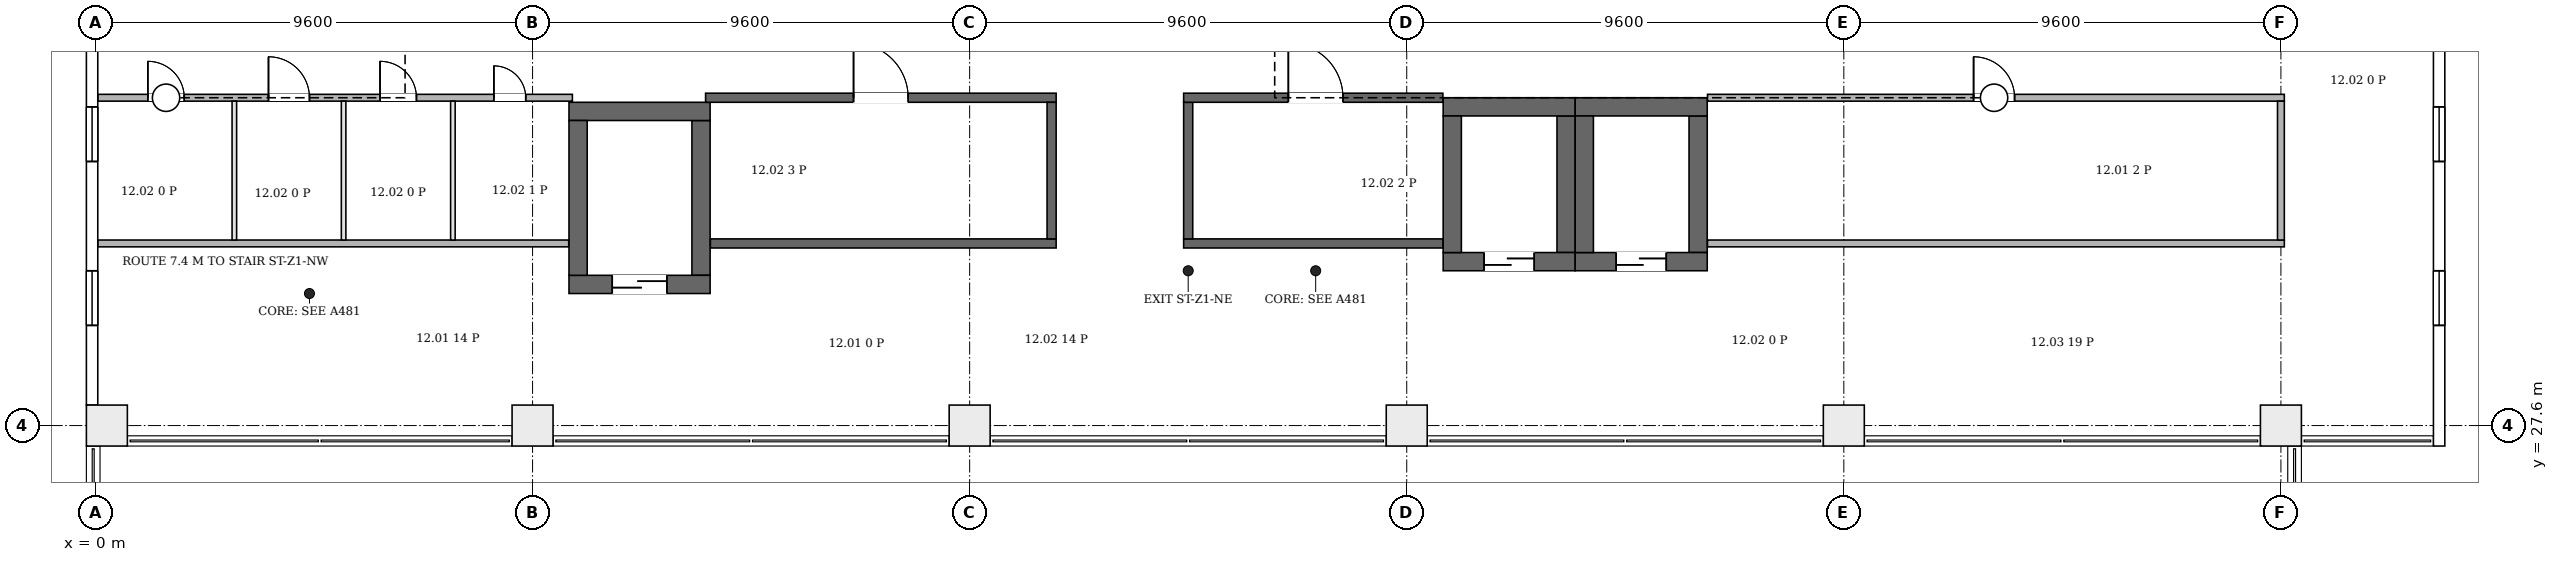
"""IFC4 building model, lengths in metres.
Left out: names, types, materials, properties, quantities, classifications, styles, units other than length and angle.
Written with IfcOpenShell. Run it as: python <this file> out.ifc"""

import sys

from ifc_helpers import new_model, si_unit, direction, frame, frame_2d, origin, origin_2d, place, context, subcontext, project, spatial, rectangle, extrude, element, fill, save


model = new_model("IFC4")
c1 = context("Model", 3, precision=1e-05, world=origin(), true_north=direction((0.0, 1.0)))
c2 = subcontext(c1, "Body", "Model", "MODEL_VIEW")
j1 = project(units=[si_unit("LENGTHUNIT", "METRE"), si_unit("PLANEANGLEUNIT", "RADIAN")], contexts=[c1])
p1 = place(None, origin())
s1 = spatial("IfcSite", under=j1, at=p1, CompositionType="ELEMENT")
p2 = place(p1, origin())
s2 = spatial("IfcBuilding", under=s1, at=p2, CompositionType="ELEMENT")
p3 = place(p2, frame((0.0, 0.0, 61.3)))
s3 = spatial("IfcBuildingStorey", under=s2, at=p3, CompositionType="ELEMENT", Elevation=61.3)
p4 = place(p3, frame((10.4, 30.7, 0.0), z_axis=(0.0, 0.0, 1.0), x_axis=(1.0, 0.0, 0.0)))
e1 = element("IfcWall", 1, at=p4, inside=s3, PredefinedType="SHEAR", context=c2, shape_type="SweptSolid", body=[
    extrude(rectangle(XDim=3.1, YDim=0.4, at=frame_2d((1.55, 0.0))), origin(), (0.0, 0.0, 1.0), 4.2),
])
p5 = place(p4, frame((0.95, 0.0, 0.0)))
e2 = element("IfcOpeningElement", 2, at=p5, cuts=e1, PredefinedType="OPENING", context=c2, shape_type="SweptSolid", body=[
    extrude(rectangle(XDim=1.2, YDim=2.1, at=frame_2d((0.6, 1.05))), frame((0.0, 0.21, 0.0), z_axis=(0.0, -1.0, 0.0), x_axis=(1.0, 0.0, 0.0)), (0.0, 0.0, 1.0), 0.42),
])
p6 = place(p3, frame((10.4, 34.5, 0.0), z_axis=(0.0, 0.0, 1.0), x_axis=(1.0, 0.0, 0.0)))
e3 = element("IfcWall", 3, at=p6, inside=s3, PredefinedType="SHEAR", context=c2, shape_type="SweptSolid", body=[
    extrude(rectangle(XDim=3.1, YDim=0.4, at=frame_2d((1.55, 0.0))), origin(), (0.0, 0.0, 1.0), 4.2),
])
for number, where, z_axis, x_axis in (
    (4, (10.6, 30.9, 0.0), (0.0, 0.0, 1.0), (0.0, 1.0, 0.0)),
    (5, (13.3, 30.9, 0.0), (0.0, 0.0, 1.0), (0.0, 1.0, 0.0)),
):
    element("IfcWall", number, at=place(p3, frame(where, z_axis=z_axis, x_axis=x_axis)), inside=s3, PredefinedType="SHEAR", context=c2, shape_type="SweptSolid", body=[
        extrude(rectangle(XDim=3.4, YDim=0.4, at=frame_2d((1.7, 0.0))), origin(), (0.0, 0.0, 1.0), 4.2),
    ])
p7 = place(p3, frame((29.6, 31.2, 0.0), z_axis=(0.0, 0.0, 1.0), x_axis=(1.0, 0.0, 0.0)))
e6 = element("IfcWall", 6, at=p7, inside=s3, PredefinedType="SHEAR", context=c2, shape_type="SweptSolid", body=[
    extrude(rectangle(XDim=2.9, YDim=0.4, at=frame_2d((1.45, 0.0))), origin(), (0.0, 0.0, 1.0), 4.2),
])
p8 = place(p7, frame((0.9, 0.0, 0.0)))
e7 = element("IfcOpeningElement", 7, at=p8, cuts=e6, PredefinedType="OPENING", context=c2, shape_type="SweptSolid", body=[
    extrude(rectangle(XDim=1.1, YDim=2.1, at=frame_2d((0.55, 1.05))), frame((0.0, 0.21, 0.0), z_axis=(0.0, -1.0, 0.0), x_axis=(1.0, 0.0, 0.0)), (0.0, 0.0, 1.0), 0.42),
])
p9 = place(p3, frame((29.6, 34.6, 0.0), z_axis=(0.0, 0.0, 1.0), x_axis=(1.0, 0.0, 0.0)))
e8 = element("IfcWall", 8, at=p9, inside=s3, PredefinedType="SHEAR", context=c2, shape_type="SweptSolid", body=[
    extrude(rectangle(XDim=2.9, YDim=0.4, at=frame_2d((1.45, 0.0))), origin(), (0.0, 0.0, 1.0), 4.2),
])
for number, where, z_axis, x_axis in (
    (9, (29.8, 31.4, 0.0), (0.0, 0.0, 1.0), (0.0, 1.0, 0.0)),
    (10, (32.3, 31.4, 0.0), (0.0, 0.0, 1.0), (0.0, 1.0, 0.0)),
):
    element("IfcWall", number, at=place(p3, frame(where, z_axis=z_axis, x_axis=x_axis)), inside=s3, PredefinedType="SHEAR", context=c2, shape_type="SweptSolid", body=[
        extrude(rectangle(XDim=3.0, YDim=0.4, at=frame_2d((1.5, 0.0))), origin(), (0.0, 0.0, 1.0), 4.2),
    ])
p10 = place(p3, frame((32.5, 31.2, 0.0), z_axis=(0.0, 0.0, 1.0), x_axis=(1.0, 0.0, 0.0)))
e11 = element("IfcWall", 11, at=p10, inside=s3, PredefinedType="SHEAR", context=c2, shape_type="SweptSolid", body=[
    extrude(rectangle(XDim=2.9, YDim=0.4, at=frame_2d((1.45, 0.0))), origin(), (0.0, 0.0, 1.0), 4.2),
])
p11 = place(p10, frame((0.9, 0.0, 0.0)))
e12 = element("IfcOpeningElement", 12, at=p11, cuts=e11, PredefinedType="OPENING", context=c2, shape_type="SweptSolid", body=[
    extrude(rectangle(XDim=1.1, YDim=2.1, at=frame_2d((0.55, 1.05))), frame((0.0, 0.21, 0.0), z_axis=(0.0, -1.0, 0.0), x_axis=(1.0, 0.0, 0.0)), (0.0, 0.0, 1.0), 0.42),
])
p12 = place(p3, frame((32.5, 34.6, 0.0), z_axis=(0.0, 0.0, 1.0), x_axis=(1.0, 0.0, 0.0)))
e13 = element("IfcWall", 13, at=p12, inside=s3, PredefinedType="SHEAR", context=c2, shape_type="SweptSolid", body=[
    extrude(rectangle(XDim=2.9, YDim=0.4, at=frame_2d((1.45, 0.0))), origin(), (0.0, 0.0, 1.0), 4.2),
])
for number, where, z_axis, x_axis in (
    (14, (32.7, 31.4, 0.0), (0.0, 0.0, 1.0), (0.0, 1.0, 0.0)),
    (15, (35.2, 31.4, 0.0), (0.0, 0.0, 1.0), (0.0, 1.0, 0.0)),
):
    element("IfcWall", number, at=place(p3, frame(where, z_axis=z_axis, x_axis=x_axis)), inside=s3, PredefinedType="SHEAR", context=c2, shape_type="SweptSolid", body=[
        extrude(rectangle(XDim=3.0, YDim=0.4, at=frame_2d((1.5, 0.0))), origin(), (0.0, 0.0, 1.0), 4.2),
    ])
for number, where, z_axis, x_axis in (
    (16, (0.25, 27.6, 0.0), (0.0, 0.0, 1.0), (1.0, 0.0, 0.0)),
    (17, (9.6, 27.6, 0.0), (0.0, 0.0, 1.0), (1.0, 0.0, 0.0)),
    (18, (19.2, 27.6, 0.0), (0.0, 0.0, 1.0), (1.0, 0.0, 0.0)),
    (19, (28.8, 27.6, 0.0), (0.0, 0.0, 1.0), (1.0, 0.0, 0.0)),
    (20, (38.4, 27.6, 0.0), (0.0, 0.0, 1.0), (1.0, 0.0, 0.0)),
    (21, (48.0, 27.6, 0.0), (0.0, 0.0, 1.0), (1.0, 0.0, 0.0)),
):
    element("IfcColumn", number, at=place(p3, frame(where, z_axis=z_axis, x_axis=x_axis)), inside=s3, PredefinedType="COLUMN", context=c2, shape_type="SweptSolid", body=[
        extrude(rectangle(XDim=0.9, YDim=0.9, at=origin_2d()), origin(), (0.0, 0.0, 1.0), 4.2),
    ])
p13 = place(p3, frame((-0.074, 36.35, 0.0), z_axis=(0.0, 0.0, 1.0), x_axis=(0.0, -1.0, 0.0)))
e22 = element("IfcWall", 22, at=p13, inside=s3, PredefinedType="ELEMENTEDWALL", context=c2, shape_type="SweptSolid", body=[
    extrude(rectangle(XDim=8.3, YDim=0.25, at=frame_2d((4.15, 0.0))), origin(), (0.0, 0.0, 1.0), 3.9),
])
p14 = place(p13, frame((5.35, 0.0, 0.9)))
e23 = element("IfcOpeningElement", 23, at=p14, cuts=e22, PredefinedType="OPENING", context=c2, shape_type="SweptSolid", body=[
    extrude(rectangle(XDim=1.2, YDim=2.6, at=frame_2d((0.6, 1.3))), frame((0.0, 0.135, 0.0), z_axis=(0.0, -1.0, 0.0), x_axis=(1.0, 0.0, 0.0)), (0.0, 0.0, 1.0), 0.27),
])
p15 = place(p13, frame((1.75, 0.0, 0.9)))
e24 = element("IfcOpeningElement", 24, at=p15, cuts=e22, PredefinedType="OPENING", context=c2, shape_type="SweptSolid", body=[
    extrude(rectangle(XDim=1.2, YDim=2.6, at=frame_2d((0.6, 1.3))), frame((0.0, 0.135, 0.0), z_axis=(0.0, -1.0, 0.0), x_axis=(1.0, 0.0, 0.0)), (0.0, 0.0, 1.0), 0.27),
])
p16 = place(p3, frame((51.475, 27.15, 0.0), z_axis=(0.0, 0.0, 1.0), x_axis=(0.0, 1.0, 0.0)))
e25 = element("IfcWall", 25, at=p16, inside=s3, PredefinedType="ELEMENTEDWALL", context=c2, shape_type="SweptSolid", body=[
    extrude(rectangle(XDim=19.3, YDim=0.25, at=frame_2d((9.65, 0.0))), origin(), (0.0, 0.0, 1.0), 3.2),
])
p17 = place(p16, frame((2.65, 0.0, 0.6)))
e26 = element("IfcOpeningElement", 26, at=p17, cuts=e25, PredefinedType="OPENING", context=c2, shape_type="SweptSolid", body=[
    extrude(rectangle(XDim=1.2, YDim=2.5, at=frame_2d((0.6, 1.25))), frame((0.0, 0.135, 0.0), z_axis=(0.0, -1.0, 0.0), x_axis=(1.0, 0.0, 0.0)), (0.0, 0.0, 1.0), 0.27),
])
p18 = place(p16, frame((6.25, 0.0, 0.6)))
e27 = element("IfcOpeningElement", 27, at=p18, cuts=e25, PredefinedType="OPENING", context=c2, shape_type="SweptSolid", body=[
    extrude(rectangle(XDim=1.2, YDim=2.5, at=frame_2d((0.6, 1.25))), frame((0.0, 0.135, 0.0), z_axis=(0.0, -1.0, 0.0), x_axis=(1.0, 0.0, 0.0)), (0.0, 0.0, 1.0), 0.27),
])
p19 = place(p16, frame((11.85, 0.0, 0.6)))
e28 = element("IfcOpeningElement", 28, at=p19, cuts=e25, PredefinedType="OPENING", context=c2, shape_type="SweptSolid", body=[
    extrude(rectangle(XDim=1.2, YDim=2.5, at=frame_2d((0.6, 1.25))), frame((0.0, 0.135, 0.0), z_axis=(0.0, -1.0, 0.0), x_axis=(1.0, 0.0, 0.0)), (0.0, 0.0, 1.0), 0.27),
])
p20 = place(p16, frame((15.45, 0.0, 0.6)))
e29 = element("IfcOpeningElement", 29, at=p20, cuts=e25, PredefinedType="OPENING", context=c2, shape_type="SweptSolid", body=[
    extrude(rectangle(XDim=1.2, YDim=2.5, at=frame_2d((0.6, 1.25))), frame((0.0, 0.135, 0.0), z_axis=(0.0, -1.0, 0.0), x_axis=(1.0, 0.0, 0.0)), (0.0, 0.0, 1.0), 0.27),
])
p21 = place(p3, frame((0.056, 31.6, 0.0), z_axis=(0.0, 0.0, 1.0), x_axis=(1.0, 0.0, 0.0)))
e30 = element("IfcWall", 30, at=p21, inside=s3, PredefinedType="PARTITIONING", context=c2, shape_type="SweptSolid", body=[
    extrude(rectangle(XDim=10.338, YDim=0.15, at=frame_2d((5.169, 0.0))), origin(), (0.0, 0.0, 1.0), 3.9),
])
p22 = place(p3, frame((0.056, 34.8, 0.0), z_axis=(0.0, 0.0, 1.0), x_axis=(1.0, 0.0, 0.0)))
e31 = element("IfcWall", 31, at=p22, inside=s3, PredefinedType="PARTITIONING", context=c2, shape_type="SweptSolid", body=[
    extrude(rectangle(XDim=10.419, YDim=0.15, at=frame_2d((5.209, 0.0))), origin(), (0.0, 0.0, 1.0), 3.9),
])
p23 = place(p22, frame((1.094, 0.0, 0.0)))
e32 = element("IfcOpeningElement", 32, at=p23, cuts=e31, PredefinedType="OPENING", context=c2, shape_type="SweptSolid", body=[
    extrude(rectangle(XDim=0.8, YDim=2.1, at=frame_2d((0.4, 1.05))), frame((0.0, 0.085, 0.0), z_axis=(0.0, -1.0, 0.0), x_axis=(1.0, 0.0, 0.0)), (0.0, 0.0, 1.0), 0.17),
])
p24 = place(p22, frame((3.744, 0.0, 0.0)))
e33 = element("IfcOpeningElement", 33, at=p24, cuts=e31, PredefinedType="OPENING", context=c2, shape_type="SweptSolid", body=[
    extrude(rectangle(XDim=0.9, YDim=2.1, at=frame_2d((0.45, 1.05))), frame((0.0, 0.085, 0.0), z_axis=(0.0, -1.0, 0.0), x_axis=(1.0, 0.0, 0.0)), (0.0, 0.0, 1.0), 0.17),
])
p25 = place(p22, frame((6.194, 0.0, 0.0)))
e34 = element("IfcOpeningElement", 34, at=p25, cuts=e31, PredefinedType="OPENING", context=c2, shape_type="SweptSolid", body=[
    extrude(rectangle(XDim=0.8, YDim=2.1, at=frame_2d((0.4, 1.05))), frame((0.0, 0.085, 0.0), z_axis=(0.0, -1.0, 0.0), x_axis=(1.0, 0.0, 0.0)), (0.0, 0.0, 1.0), 0.17),
])
p26 = place(p22, frame((8.694, 0.0, 0.0)))
e35 = element("IfcOpeningElement", 35, at=p26, cuts=e31, PredefinedType="OPENING", context=c2, shape_type="SweptSolid", body=[
    extrude(rectangle(XDim=0.7, YDim=2.1, at=frame_2d((0.35, 1.05))), frame((0.0, 0.085, 0.0), z_axis=(0.0, -1.0, 0.0), x_axis=(1.0, 0.0, 0.0)), (0.0, 0.0, 1.0), 0.17),
])
for number, where, z_axis, x_axis in (
    (36, (3.05, 31.675, 0.0), (0.0, 0.0, 1.0), (0.0, 1.0, 0.0)),
    (37, (5.45, 31.675, 0.0), (0.0, 0.0, 1.0), (0.0, 1.0, 0.0)),
    (38, (7.85, 31.675, 0.0), (0.0, 0.0, 1.0), (0.0, 1.0, 0.0)),
):
    element("IfcWall", number, at=place(p3, frame(where, z_axis=z_axis, x_axis=x_axis)), inside=s3, PredefinedType="PARTITIONING", context=c2, shape_type="SweptSolid", body=[
        extrude(rectangle(XDim=3.05, YDim=0.1, at=frame_2d((1.525, 0.0))), origin(), (0.0, 0.0, 1.0), 3.9),
    ])
p27 = place(p3, frame((13.4, 34.8, 0.0), z_axis=(0.0, 0.0, 1.0), x_axis=(1.0, 0.0, 0.0)))
e39 = element("IfcWall", 39, at=p27, inside=s3, PredefinedType="PARTITIONING", context=c2, shape_type="SweptSolid", body=[
    extrude(rectangle(XDim=7.7, YDim=0.2, at=frame_2d((3.85, 0.0))), origin(), (0.0, 0.0, 1.0), 3.9),
])
p28 = place(p27, frame((3.25, 0.0, 0.0)))
e40 = element("IfcOpeningElement", 40, at=p28, cuts=e39, PredefinedType="OPENING", context=c2, shape_type="SweptSolid", body=[
    extrude(rectangle(XDim=1.2, YDim=2.1, at=frame_2d((0.6, 1.05))), frame((0.0, 0.11, 0.0), z_axis=(0.0, -1.0, 0.0), x_axis=(1.0, 0.0, 0.0)), (0.0, 0.0, 1.0), 0.22),
])
p29 = place(p3, frame((13.506, 31.6, 0.0), z_axis=(0.0, 0.0, 1.0), x_axis=(1.0, 0.0, 0.0)))
e41 = element("IfcWall", 41, at=p29, inside=s3, PredefinedType="PARTITIONING", context=c2, shape_type="SweptSolid", body=[
    extrude(rectangle(XDim=7.594, YDim=0.2, at=frame_2d((3.797, 0.0))), origin(), (0.0, 0.0, 1.0), 3.9),
])
p30 = place(p3, frame((21.0, 31.7, 0.0), z_axis=(0.0, 0.0, 1.0), x_axis=(0.0, 1.0, 0.0)))
e42 = element("IfcWall", 42, at=p30, inside=s3, PredefinedType="PARTITIONING", context=c2, shape_type="SweptSolid", body=[
    extrude(rectangle(XDim=3.0, YDim=0.2, at=frame_2d((1.5, 0.0))), origin(), (0.0, 0.0, 1.0), 3.9),
])
p31 = place(p3, frame((23.9, 31.6, 0.0), z_axis=(0.0, 0.0, 1.0), x_axis=(1.0, 0.0, 0.0)))
e43 = element("IfcWall", 43, at=p31, inside=s3, PredefinedType="PARTITIONING", context=c2, shape_type="SweptSolid", body=[
    extrude(rectangle(XDim=5.694, YDim=0.2, at=frame_2d((2.847, 0.0))), origin(), (0.0, 0.0, 1.0), 3.9),
])
p32 = place(p3, frame((24.0, 31.7, 0.0), z_axis=(0.0, 0.0, 1.0), x_axis=(0.0, 1.0, 0.0)))
e44 = element("IfcWall", 44, at=p32, inside=s3, PredefinedType="PARTITIONING", context=c2, shape_type="SweptSolid", body=[
    extrude(rectangle(XDim=3.0, YDim=0.2, at=frame_2d((1.5, 0.0))), origin(), (0.0, 0.0, 1.0), 3.9),
])
p33 = place(p3, frame((23.9, 34.8, 0.0), z_axis=(0.0, 0.0, 1.0), x_axis=(1.0, 0.0, 0.0)))
e45 = element("IfcWall", 45, at=p33, inside=s3, PredefinedType="PARTITIONING", context=c2, shape_type="SweptSolid", body=[
    extrude(rectangle(XDim=5.694, YDim=0.2, at=frame_2d((2.847, 0.0))), origin(), (0.0, 0.0, 1.0), 3.9),
])
p34 = place(p33, frame((2.3, 0.0, 0.0)))
e46 = element("IfcOpeningElement", 46, at=p34, cuts=e45, PredefinedType="OPENING", context=c2, shape_type="SweptSolid", body=[
    extrude(rectangle(XDim=1.2, YDim=2.1, at=frame_2d((0.6, 1.05))), frame((0.0, 0.11, 0.0), z_axis=(0.0, -1.0, 0.0), x_axis=(1.0, 0.0, 0.0)), (0.0, 0.0, 1.0), 0.22),
])
p35 = place(p3, frame((35.406, 31.6, 0.0), z_axis=(0.0, 0.0, 1.0), x_axis=(1.0, 0.0, 0.0)))
e47 = element("IfcWall", 47, at=p35, inside=s3, PredefinedType="PARTITIONING", context=c2, shape_type="SweptSolid", body=[
    extrude(rectangle(XDim=12.669, YDim=0.15, at=frame_2d((6.334, 0.0))), origin(), (0.0, 0.0, 1.0), 3.9),
])
p36 = place(p3, frame((35.406, 34.8, 0.0), z_axis=(0.0, 0.0, 1.0), x_axis=(1.0, 0.0, 0.0)))
e48 = element("IfcWall", 48, at=p36, inside=s3, PredefinedType="PARTITIONING", context=c2, shape_type="SweptSolid", body=[
    extrude(rectangle(XDim=12.669, YDim=0.15, at=frame_2d((6.334, 0.0))), origin(), (0.0, 0.0, 1.0), 3.9),
])
p37 = place(p36, frame((5.844, 0.0, 0.0)))
e49 = element("IfcOpeningElement", 49, at=p37, cuts=e48, PredefinedType="OPENING", context=c2, shape_type="SweptSolid", body=[
    extrude(rectangle(XDim=0.9, YDim=2.1, at=frame_2d((0.45, 1.05))), frame((0.0, 0.085, 0.0), z_axis=(0.0, -1.0, 0.0), x_axis=(1.0, 0.0, 0.0)), (0.0, 0.0, 1.0), 0.17),
])
p38 = place(p3, frame((48.0, 31.675, 0.0), z_axis=(0.0, 0.0, 1.0), x_axis=(0.0, 1.0, 0.0)))
e50 = element("IfcWall", 50, at=p38, inside=s3, PredefinedType="PARTITIONING", context=c2, shape_type="SweptSolid", body=[
    extrude(rectangle(XDim=3.05, YDim=0.15, at=frame_2d((1.525, 0.0))), origin(), (0.0, 0.0, 1.0), 3.3),
])
p39 = place(p14, origin())
e51 = element("IfcWindow", 51, at=p39, inside=s3, PartitioningType="SINGLE_PANEL", PredefinedType="WINDOW", context=c2, shape_type="SweptSolid", body=[
    extrude(rectangle(XDim=1.2, YDim=2.6, at=frame_2d((0.6, 1.3))), frame((0.0, 0.03, 0.0), z_axis=(0.0, -1.0, 0.0), x_axis=(1.0, 0.0, 0.0)), (0.0, 0.0, 1.0), 0.06),
])
fill(e23, e51)
p40 = place(p15, origin())
e52 = element("IfcWindow", 52, at=p40, inside=s3, PartitioningType="SINGLE_PANEL", PredefinedType="WINDOW", context=c2, shape_type="SweptSolid", body=[
    extrude(rectangle(XDim=1.2, YDim=2.6, at=frame_2d((0.6, 1.3))), frame((0.0, 0.03, 0.0), z_axis=(0.0, -1.0, 0.0), x_axis=(1.0, 0.0, 0.0)), (0.0, 0.0, 1.0), 0.06),
])
fill(e24, e52)
p41 = place(p17, origin())
e53 = element("IfcWindow", 53, at=p41, inside=s3, PartitioningType="SINGLE_PANEL", PredefinedType="WINDOW", context=c2, shape_type="SweptSolid", body=[
    extrude(rectangle(XDim=1.2, YDim=2.5, at=frame_2d((0.6, 1.25))), frame((0.0, 0.03, 0.0), z_axis=(0.0, -1.0, 0.0), x_axis=(1.0, 0.0, 0.0)), (0.0, 0.0, 1.0), 0.06),
])
fill(e26, e53)
p42 = place(p18, origin())
e54 = element("IfcWindow", 54, at=p42, inside=s3, PartitioningType="SINGLE_PANEL", PredefinedType="WINDOW", context=c2, shape_type="SweptSolid", body=[
    extrude(rectangle(XDim=1.2, YDim=2.5, at=frame_2d((0.6, 1.25))), frame((0.0, 0.03, 0.0), z_axis=(0.0, -1.0, 0.0), x_axis=(1.0, 0.0, 0.0)), (0.0, 0.0, 1.0), 0.06),
])
fill(e27, e54)
p43 = place(p5, origin())
e55 = element("IfcDoor", 55, at=p43, inside=s3, OperationType="DOUBLE_DOOR_SLIDING", PredefinedType="DOOR", context=c2, shape_type="SweptSolid", body=[
    extrude(rectangle(XDim=1.2, YDim=2.1, at=frame_2d((0.6, 1.05))), frame((0.0, 0.025, 0.0), z_axis=(0.0, -1.0, 0.0), x_axis=(1.0, 0.0, 0.0)), (0.0, 0.0, 1.0), 0.05),
])
fill(e2, e55)
p44 = place(p8, origin())
e56 = element("IfcDoor", 56, at=p44, inside=s3, OperationType="DOUBLE_DOOR_SLIDING", PredefinedType="DOOR", context=c2, shape_type="SweptSolid", body=[
    extrude(rectangle(XDim=1.1, YDim=2.1, at=frame_2d((0.55, 1.05))), frame((0.0, 0.025, 0.0), z_axis=(0.0, -1.0, 0.0), x_axis=(1.0, 0.0, 0.0)), (0.0, 0.0, 1.0), 0.05),
])
fill(e7, e56)
p45 = place(p11, origin())
e57 = element("IfcDoor", 57, at=p45, inside=s3, OperationType="DOUBLE_DOOR_SLIDING", PredefinedType="DOOR", context=c2, shape_type="SweptSolid", body=[
    extrude(rectangle(XDim=1.1, YDim=2.1, at=frame_2d((0.55, 1.05))), frame((0.0, 0.025, 0.0), z_axis=(0.0, -1.0, 0.0), x_axis=(1.0, 0.0, 0.0)), (0.0, 0.0, 1.0), 0.05),
])
fill(e12, e57)
p46 = place(p23, origin())
e58 = element("IfcDoor", 58, at=p46, inside=s3, OperationType="SINGLE_SWING_RIGHT", PredefinedType="DOOR", context=c2, shape_type="SweptSolid", body=[
    extrude(rectangle(XDim=0.8, YDim=2.1, at=frame_2d((0.4, 1.05))), frame((0.0, 0.025, 0.0), z_axis=(0.0, -1.0, 0.0), x_axis=(1.0, 0.0, 0.0)), (0.0, 0.0, 1.0), 0.05),
])
fill(e32, e58)
p47 = place(p24, origin())
e59 = element("IfcDoor", 59, at=p47, inside=s3, OperationType="SINGLE_SWING_LEFT", PredefinedType="DOOR", context=c2, shape_type="SweptSolid", body=[
    extrude(rectangle(XDim=0.9, YDim=2.1, at=frame_2d((0.45, 1.05))), frame((0.0, 0.025, 0.0), z_axis=(0.0, -1.0, 0.0), x_axis=(1.0, 0.0, 0.0)), (0.0, 0.0, 1.0), 0.05),
])
fill(e33, e59)
p48 = place(p25, origin())
e60 = element("IfcDoor", 60, at=p48, inside=s3, OperationType="SINGLE_SWING_RIGHT", PredefinedType="DOOR", context=c2, shape_type="SweptSolid", body=[
    extrude(rectangle(XDim=0.8, YDim=2.1, at=frame_2d((0.4, 1.05))), frame((0.0, 0.025, 0.0), z_axis=(0.0, -1.0, 0.0), x_axis=(1.0, 0.0, 0.0)), (0.0, 0.0, 1.0), 0.05),
])
fill(e34, e60)
p49 = place(p26, origin())
e61 = element("IfcDoor", 61, at=p49, inside=s3, OperationType="SINGLE_SWING_LEFT", PredefinedType="DOOR", context=c2, shape_type="SweptSolid", body=[
    extrude(rectangle(XDim=0.7, YDim=2.1, at=frame_2d((0.35, 1.05))), frame((0.0, 0.025, 0.0), z_axis=(0.0, -1.0, 0.0), x_axis=(1.0, 0.0, 0.0)), (0.0, 0.0, 1.0), 0.05),
])
fill(e35, e61)
p50 = place(p28, origin())
e62 = element("IfcDoor", 62, at=p50, inside=s3, OperationType="SINGLE_SWING_RIGHT", PredefinedType="DOOR", context=c2, shape_type="SweptSolid", body=[
    extrude(rectangle(XDim=1.2, YDim=2.1, at=frame_2d((0.6, 1.05))), frame((0.0, 0.025, 0.0), z_axis=(0.0, -1.0, 0.0), x_axis=(1.0, 0.0, 0.0)), (0.0, 0.0, 1.0), 0.05),
])
fill(e40, e62)
p51 = place(p34, origin())
e63 = element("IfcDoor", 63, at=p51, inside=s3, OperationType="SINGLE_SWING_LEFT", PredefinedType="DOOR", context=c2, shape_type="SweptSolid", body=[
    extrude(rectangle(XDim=1.2, YDim=2.1, at=frame_2d((0.6, 1.05))), frame((0.0, 0.025, 0.0), z_axis=(0.0, -1.0, 0.0), x_axis=(1.0, 0.0, 0.0)), (0.0, 0.0, 1.0), 0.05),
])
fill(e46, e63)
p52 = place(p37, origin())
e64 = element("IfcDoor", 64, at=p52, inside=s3, OperationType="SINGLE_SWING_RIGHT", PredefinedType="DOOR", context=c2, shape_type="SweptSolid", body=[
    extrude(rectangle(XDim=0.9, YDim=2.1, at=frame_2d((0.45, 1.05))), frame((0.0, 0.025, 0.0), z_axis=(0.0, -1.0, 0.0), x_axis=(1.0, 0.0, 0.0)), (0.0, 0.0, 1.0), 0.05),
])
fill(e49, e64)
save(model, sys.argv[1])
